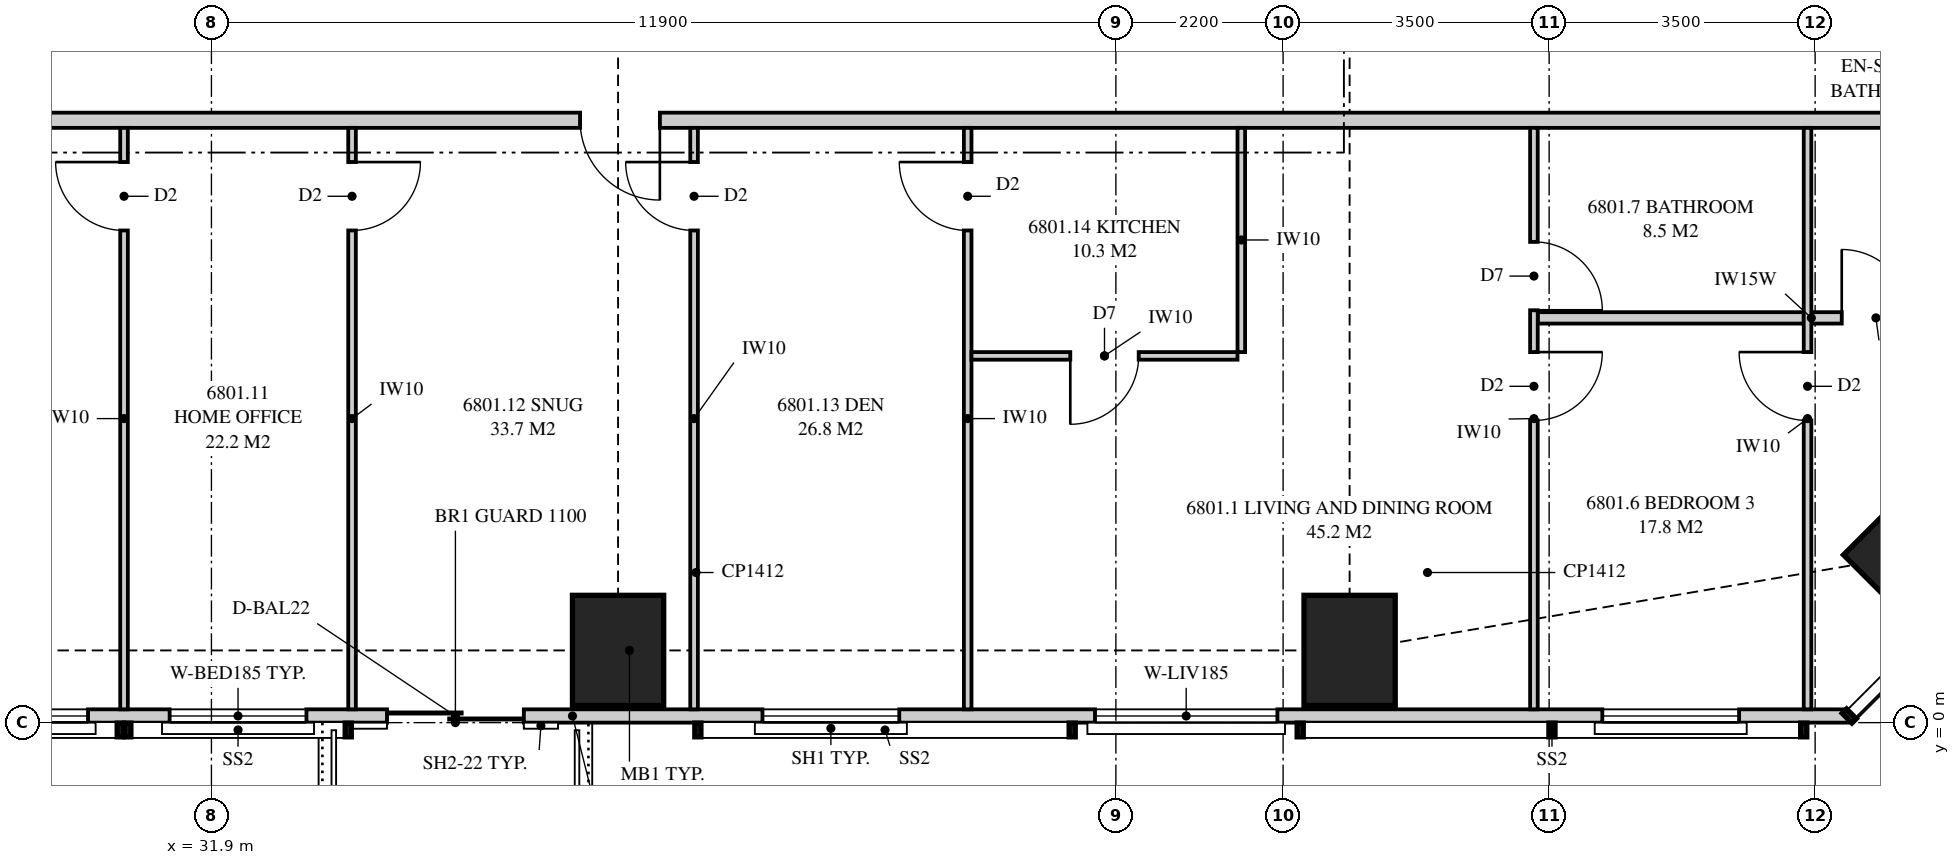
"""IFC4 building model, lengths in metres.
Left out: names, types, materials, properties, quantities, classifications, styles, units other than length and angle.
Written with IfcOpenShell. Run it as: python <this file> out.ifc"""

import sys

from ifc_helpers import new_model, si_unit, direction, frame, frame_2d, origin, origin_2d, place, context, subcontext, project, spatial, polyline, rectangle, outline, extrude, element, fill, save


model = new_model("IFC4")
c1 = context("Model", 3, precision=1e-05, world=origin(), true_north=direction((0.0, 1.0)))
c2 = subcontext(c1, "Body", "Model", "MODEL_VIEW")
j1 = project(units=[si_unit("LENGTHUNIT", "METRE"), si_unit("PLANEANGLEUNIT", "RADIAN")], contexts=[c1])
p1 = place(None, origin())
s1 = spatial("IfcSite", under=j1, at=p1, CompositionType="ELEMENT")
p2 = place(p1, origin())
s2 = spatial("IfcBuilding", under=s1, at=p2, CompositionType="ELEMENT")
p3 = place(p2, frame((0.0, 0.0, 249.45)))
s3 = spatial("IfcBuildingStorey", under=s2, at=p3, CompositionType="ELEMENT", Elevation=249.45)
for number, where, z_axis, x_axis in (
    (1, (37.25, 0.95, 0.0), (0.0, 0.0, 1.0), (0.0, 1.0, 0.0)),
    (2, (46.875, 0.95, 0.0), (0.0, 0.0, 1.0), (0.0, 1.0, 0.0)),
):
    element("IfcColumn", number, at=place(p3, frame(where, z_axis=z_axis, x_axis=x_axis)), inside=s3, PredefinedType="COLUMN", context=c2, shape_type="SweptSolid", body=[
        extrude(rectangle(XDim=1.45, YDim=1.2, at=origin_2d()), origin(), (0.0, 0.0, 1.0), 3.5),
    ])
p4 = place(p3, frame((54.293, 2.207, 0.0), z_axis=(0.0, 0.0, 1.0), x_axis=(0.707106781187, 0.707106781187, 0.0)))
e3 = element("IfcColumn", 3, at=p4, inside=s3, PredefinedType="COLUMN", context=c2, shape_type="SweptSolid", body=[
    extrude(rectangle(XDim=1.3, YDim=1.3, at=origin_2d()), origin(), (0.0, 0.0, 1.0), 3.5),
])
p5 = place(p3, frame((19.851, 0.087, 0.0), z_axis=(0.0, 0.0, 1.0), x_axis=(1.0, 0.0, 0.0)))
e4 = element("IfcWall", 4, at=p5, inside=s3, PredefinedType="SOLIDWALL", context=c2, shape_type="SweptSolid", body=[
    extrude(outline(polyline([(0.0, 0.0), (33.597, 0.0), (33.597, 3.26), (27.239, 3.26), (27.239, 2.3), (27.155, 2.3), (27.155, 3.26), (27.024, 3.26), (27.024, 2.3), (7.774, 2.3), (7.774, 3.26), (7.642, 3.26), (7.642, 2.3), (7.559, 2.3), (7.559, 3.26), (0.0, 3.26), (0.0, 0.0)])), frame((0.0, 0.087, 0.0), z_axis=(0.0, -1.0, 0.0), x_axis=(1.0, 0.0, 0.0)), (0.0, 0.0, 1.0), 0.175),
])
p6 = place(p5, frame((2.649, 0.0, 0.4)))
e5 = element("IfcOpeningElement", 5, at=p6, cuts=e4, PredefinedType="OPENING", context=c2, shape_type="SweptSolid", body=[
    extrude(rectangle(XDim=1.8, YDim=1.85, at=frame_2d((0.9, 0.925))), frame((0.0, 0.097, 0.0), z_axis=(0.0, -1.0, 0.0), x_axis=(1.0, 0.0, 0.0)), (0.0, 0.0, 1.0), 0.195),
])
p7 = place(p5, frame((8.625, 0.0, 0.4)))
e6 = element("IfcOpeningElement", 6, at=p7, cuts=e4, PredefinedType="OPENING", context=c2, shape_type="SweptSolid", body=[
    extrude(rectangle(XDim=1.8, YDim=1.85, at=frame_2d((0.9, 0.925))), frame((0.0, 0.097, 0.0), z_axis=(0.0, -1.0, 0.0), x_axis=(1.0, 0.0, 0.0)), (0.0, 0.0, 1.0), 0.195),
])
p8 = place(p5, frame((11.499, 0.0, 0.4)))
e7 = element("IfcOpeningElement", 7, at=p8, cuts=e4, PredefinedType="OPENING", context=c2, shape_type="SweptSolid", body=[
    extrude(rectangle(XDim=1.8, YDim=1.85, at=frame_2d((0.9, 0.925))), frame((0.0, 0.097, 0.0), z_axis=(0.0, -1.0, 0.0), x_axis=(1.0, 0.0, 0.0)), (0.0, 0.0, 1.0), 0.195),
])
p9 = place(p5, frame((14.359, 0.0, 0.0)))
e8 = element("IfcOpeningElement", 8, at=p9, cuts=e4, PredefinedType="OPENING", context=c2, shape_type="SweptSolid", body=[
    extrude(rectangle(XDim=1.8, YDim=2.25, at=frame_2d((0.9, 1.125))), frame((0.0, 0.097, 0.0), z_axis=(0.0, -1.0, 0.0), x_axis=(1.0, 0.0, 0.0)), (0.0, 0.0, 1.0), 0.195),
])
p10 = place(p5, frame((19.299, 0.0, 0.4)))
e9 = element("IfcOpeningElement", 9, at=p10, cuts=e4, PredefinedType="OPENING", context=c2, shape_type="SweptSolid", body=[
    extrude(rectangle(XDim=1.8, YDim=1.85, at=frame_2d((0.9, 0.925))), frame((0.0, 0.097, 0.0), z_axis=(0.0, -1.0, 0.0), x_axis=(1.0, 0.0, 0.0)), (0.0, 0.0, 1.0), 0.195),
])
p11 = place(p5, frame((23.674, 0.0, 0.4)))
e10 = element("IfcOpeningElement", 10, at=p11, cuts=e4, PredefinedType="OPENING", context=c2, shape_type="SweptSolid", body=[
    extrude(rectangle(XDim=2.4, YDim=1.85, at=frame_2d((1.2, 0.925))), frame((0.0, 0.097, 0.0), z_axis=(0.0, -1.0, 0.0), x_axis=(1.0, 0.0, 0.0)), (0.0, 0.0, 1.0), 0.195),
])
p12 = place(p5, frame((30.349, 0.0, 0.4)))
e11 = element("IfcOpeningElement", 11, at=p12, cuts=e4, PredefinedType="OPENING", context=c2, shape_type="SweptSolid", body=[
    extrude(rectangle(XDim=1.8, YDim=1.85, at=frame_2d((0.9, 0.925))), frame((0.0, 0.097, 0.0), z_axis=(0.0, -1.0, 0.0), x_axis=(1.0, 0.0, 0.0)), (0.0, 0.0, 1.0), 0.195),
])
p13 = place(p3, frame((18.0, 7.925, 0.0), z_axis=(0.0, 0.0, 1.0), x_axis=(1.0, 0.0, 0.0)))
e12 = element("IfcWall", 12, at=p13, inside=s3, PredefinedType="PARTITIONING", context=c2, shape_type="SweptSolid", body=[
    extrude(outline(polyline([(0.0, 0.0), (38.325, 0.0), (38.325, 3.26), (37.875, 3.26), (37.875, 2.3), (36.043, 2.3), (36.043, 3.26), (30.185, 3.26), (30.185, 2.66), (27.565, 2.66), (27.565, 3.26), (20.56, 3.26), (20.56, 2.66), (17.94, 2.66), (17.94, 3.26), (10.935, 3.26), (10.935, 2.66), (8.315, 2.66), (8.315, 3.26), (1.839, 3.26), (1.839, 2.3), (0.0, 2.3), (0.0, 3.26), (0.0, 0.0)])), frame((0.0, 0.1, 0.0), z_axis=(0.0, -1.0, 0.0), x_axis=(1.0, 0.0, 0.0)), (0.0, 0.0, 1.0), 0.2),
])
p14 = place(p13, frame((18.75, 0.0, 0.0)))
e13 = element("IfcOpeningElement", 13, at=p14, cuts=e12, PredefinedType="OPENING", context=c2, shape_type="SweptSolid", body=[
    extrude(rectangle(XDim=1.05, YDim=2.2, at=frame_2d((0.525, 1.1))), frame((0.0, 0.11, 0.0), z_axis=(0.0, -1.0, 0.0), x_axis=(1.0, 0.0, 0.0)), (0.0, 0.0, 1.0), 0.22),
])
p15 = place(p3, frame((49.3, 0.175, 0.0), z_axis=(0.0, 0.0, 1.0), x_axis=(0.0, 1.0, 0.0)))
e14 = element("IfcWall", 14, at=p15, inside=s3, PredefinedType="PARTITIONING", context=c2, shape_type="SweptSolid", body=[
    extrude(outline(polyline([(0.0, 0.0), (7.65, 0.0), (7.65, 3.26), (2.058, 3.26), (2.058, 2.3), (0.314, 2.3), (0.314, 3.26), (0.0, 3.26), (0.0, 0.0)])), frame((0.0, 0.05, 0.0), z_axis=(0.0, -1.0, 0.0), x_axis=(1.0, 0.0, 0.0)), (0.0, 0.0, 1.0), 0.1),
])
p16 = place(p15, frame((3.8, 0.0, 0.0)))
e15 = element("IfcOpeningElement", 15, at=p16, cuts=e14, PredefinedType="OPENING", context=c2, shape_type="SweptSolid", body=[
    extrude(rectangle(XDim=0.9, YDim=2.1, at=frame_2d((0.45, 1.05))), frame((0.0, 0.06, 0.0), z_axis=(0.0, -1.0, 0.0), x_axis=(1.0, 0.0, 0.0)), (0.0, 0.0, 1.0), 0.12),
])
p17 = place(p15, frame((5.25, 0.0, 0.0)))
e16 = element("IfcOpeningElement", 16, at=p17, cuts=e14, PredefinedType="OPENING", context=c2, shape_type="SweptSolid", body=[
    extrude(rectangle(XDim=0.9, YDim=2.1, at=frame_2d((0.45, 1.05))), frame((0.0, 0.06, 0.0), z_axis=(0.0, -1.0, 0.0), x_axis=(1.0, 0.0, 0.0)), (0.0, 0.0, 1.0), 0.12),
])
p18 = place(p3, frame((52.9, 0.175, 0.0), z_axis=(0.0, 0.0, 1.0), x_axis=(0.0, 1.0, 0.0)))
e17 = element("IfcWall", 17, at=p18, inside=s3, PredefinedType="PARTITIONING", context=c2, shape_type="SweptSolid", body=[
    extrude(outline(polyline([(0.0, 0.0), (7.65, 0.0), (7.65, 3.26), (2.668, 3.26), (2.668, 2.3), (0.924, 2.3), (0.924, 3.26), (0.0, 3.26), (0.0, 0.0)])), frame((0.0, 0.05, 0.0), z_axis=(0.0, -1.0, 0.0), x_axis=(1.0, 0.0, 0.0)), (0.0, 0.0, 1.0), 0.1),
])
p19 = place(p18, frame((3.8, 0.0, 0.0)))
e18 = element("IfcOpeningElement", 18, at=p19, cuts=e17, PredefinedType="OPENING", context=c2, shape_type="SweptSolid", body=[
    extrude(rectangle(XDim=0.9, YDim=2.1, at=frame_2d((0.45, 1.05))), frame((0.0, 0.06, 0.0), z_axis=(0.0, -1.0, 0.0), x_axis=(1.0, 0.0, 0.0)), (0.0, 0.0, 1.0), 0.12),
])
p20 = place(p3, frame((49.35, 5.325, 0.0), z_axis=(0.0, 0.0, 1.0), x_axis=(1.0, 0.0, 0.0)))
e19 = element("IfcWall", 19, at=p20, inside=s3, PredefinedType="PLUMBINGWALL", context=c2, shape_type="SweptSolid", body=[
    extrude(rectangle(XDim=3.5, YDim=0.15, at=frame_2d((1.75, 0.0))), origin(), (0.0, 0.0, 1.0), 3.26),
])
p21 = place(p3, frame((52.95, 5.325, 0.0), z_axis=(0.0, 0.0, 1.0), x_axis=(1.0, 0.0, 0.0)))
e20 = element("IfcWall", 20, at=p21, inside=s3, PredefinedType="PLUMBINGWALL", context=c2, shape_type="SweptSolid", body=[
    extrude(outline(polyline([(0.0, 0.0), (3.55, 0.0), (3.55, 3.26), (2.597, 3.26), (2.597, 2.3), (0.815, 2.3), (0.815, 3.26), (0.0, 3.26), (0.0, 0.0)])), frame((0.0, 0.075, 0.0), z_axis=(0.0, -1.0, 0.0), x_axis=(1.0, 0.0, 0.0)), (0.0, 0.0, 1.0), 0.15),
])
p22 = place(p21, frame((0.4, 0.0, 0.0)))
e21 = element("IfcOpeningElement", 21, at=p22, cuts=e20, PredefinedType="OPENING", context=c2, shape_type="SweptSolid", body=[
    extrude(rectangle(XDim=0.9, YDim=2.1, at=frame_2d((0.45, 1.05))), frame((0.0, 0.085, 0.0), z_axis=(0.0, -1.0, 0.0), x_axis=(1.0, 0.0, 0.0)), (0.0, 0.0, 1.0), 0.17),
])
p23 = place(p3, frame((30.75, 0.175, 0.0), z_axis=(0.0, 0.0, 1.0), x_axis=(0.0, 1.0, 0.0)))
e22 = element("IfcWall", 22, at=p23, inside=s3, PredefinedType="PARTITIONING", context=c2, shape_type="SweptSolid", body=[
    extrude(outline(polyline([(0.0, 0.0), (7.65, 0.0), (7.65, 3.26), (1.635, 3.26), (1.635, 2.3), (0.0, 2.3), (0.0, 3.26), (0.0, 0.0)])), frame((0.0, 0.05, 0.0), z_axis=(0.0, -1.0, 0.0), x_axis=(1.0, 0.0, 0.0)), (0.0, 0.0, 1.0), 0.1),
])
p24 = place(p23, frame((6.3, 0.0, 0.0)))
e23 = element("IfcOpeningElement", 23, at=p24, cuts=e22, PredefinedType="OPENING", context=c2, shape_type="SweptSolid", body=[
    extrude(rectangle(XDim=0.9, YDim=2.1, at=frame_2d((0.45, 1.05))), frame((0.0, 0.06, 0.0), z_axis=(0.0, -1.0, 0.0), x_axis=(1.0, 0.0, 0.0)), (0.0, 0.0, 1.0), 0.12),
])
p25 = place(p3, frame((33.75, 0.175, 0.0), z_axis=(0.0, 0.0, 1.0), x_axis=(0.0, 1.0, 0.0)))
e24 = element("IfcWall", 24, at=p25, inside=s3, PredefinedType="PARTITIONING", context=c2, shape_type="SweptSolid", body=[
    extrude(outline(polyline([(0.0, 0.0), (7.65, 0.0), (7.65, 3.26), (1.635, 3.26), (1.635, 2.3), (0.0, 2.3), (0.0, 3.26), (0.0, 0.0)])), frame((0.0, 0.05, 0.0), z_axis=(0.0, -1.0, 0.0), x_axis=(1.0, 0.0, 0.0)), (0.0, 0.0, 1.0), 0.1),
])
p26 = place(p25, frame((6.3, 0.0, 0.0)))
e25 = element("IfcOpeningElement", 25, at=p26, cuts=e24, PredefinedType="OPENING", context=c2, shape_type="SweptSolid", body=[
    extrude(rectangle(XDim=0.9, YDim=2.1, at=frame_2d((0.45, 1.05))), frame((0.0, 0.06, 0.0), z_axis=(0.0, -1.0, 0.0), x_axis=(1.0, 0.0, 0.0)), (0.0, 0.0, 1.0), 0.12),
])
p27 = place(p3, frame((38.25, 0.175, 0.0), z_axis=(0.0, 0.0, 1.0), x_axis=(0.0, 1.0, 0.0)))
e26 = element("IfcWall", 26, at=p27, inside=s3, PredefinedType="PARTITIONING", context=c2, shape_type="SweptSolid", body=[
    extrude(outline(polyline([(0.0, 0.0), (7.65, 0.0), (7.65, 3.26), (7.65, 2.66), (1.635, 2.66), (1.635, 2.3), (0.0, 2.3), (0.0, 3.26), (0.0, 0.0)])), frame((0.0, 0.05, 0.0), z_axis=(0.0, -1.0, 0.0), x_axis=(1.0, 0.0, 0.0)), (0.0, 0.0, 1.0), 0.1),
])
p28 = place(p27, frame((6.3, 0.0, 0.0)))
e27 = element("IfcOpeningElement", 27, at=p28, cuts=e26, PredefinedType="OPENING", context=c2, shape_type="SweptSolid", body=[
    extrude(rectangle(XDim=0.9, YDim=2.1, at=frame_2d((0.45, 1.05))), frame((0.0, 0.06, 0.0), z_axis=(0.0, -1.0, 0.0), x_axis=(1.0, 0.0, 0.0)), (0.0, 0.0, 1.0), 0.12),
])
p29 = place(p3, frame((41.85, 0.175, 0.0), z_axis=(0.0, 0.0, 1.0), x_axis=(0.0, 1.0, 0.0)))
e28 = element("IfcWall", 28, at=p29, inside=s3, PredefinedType="PARTITIONING", context=c2, shape_type="SweptSolid", body=[
    extrude(outline(polyline([(0.0, 0.0), (7.65, 0.0), (7.65, 3.26), (1.635, 3.26), (1.635, 2.3), (0.0, 2.3), (0.0, 3.26), (0.0, 0.0)])), frame((0.0, 0.05, 0.0), z_axis=(0.0, -1.0, 0.0), x_axis=(1.0, 0.0, 0.0)), (0.0, 0.0, 1.0), 0.1),
])
p30 = place(p29, frame((6.3, 0.0, 0.0)))
e29 = element("IfcOpeningElement", 29, at=p30, cuts=e28, PredefinedType="OPENING", context=c2, shape_type="SweptSolid", body=[
    extrude(rectangle(XDim=0.9, YDim=2.1, at=frame_2d((0.45, 1.05))), frame((0.0, 0.06, 0.0), z_axis=(0.0, -1.0, 0.0), x_axis=(1.0, 0.0, 0.0)), (0.0, 0.0, 1.0), 0.12),
])
p31 = place(p3, frame((41.9, 4.825, 0.0), z_axis=(0.0, 0.0, 1.0), x_axis=(1.0, 0.0, 0.0)))
e30 = element("IfcWall", 30, at=p31, inside=s3, PredefinedType="PARTITIONING", context=c2, shape_type="SweptSolid", body=[
    extrude(rectangle(XDim=3.5, YDim=0.1, at=frame_2d((1.75, 0.0))), origin(), (0.0, 0.0, 1.0), 3.26),
])
p32 = place(p31, frame((1.3, 0.0, 0.0)))
e31 = element("IfcOpeningElement", 31, at=p32, cuts=e30, PredefinedType="OPENING", context=c2, shape_type="SweptSolid", body=[
    extrude(rectangle(XDim=0.9, YDim=2.1, at=frame_2d((0.45, 1.05))), frame((0.0, 0.06, 0.0), z_axis=(0.0, -1.0, 0.0), x_axis=(1.0, 0.0, 0.0)), (0.0, 0.0, 1.0), 0.12),
])
p33 = place(p3, frame((45.45, 4.875, 0.0), z_axis=(0.0, 0.0, 1.0), x_axis=(0.0, 1.0, 0.0)))
e32 = element("IfcWall", 32, at=p33, inside=s3, PredefinedType="PARTITIONING", context=c2, shape_type="SweptSolid", body=[
    extrude(rectangle(XDim=2.95, YDim=0.1, at=frame_2d((1.475, 0.0))), origin(), (0.0, 0.0, 1.0), 3.26),
])
p34 = place(p7, origin())
e33 = element("IfcWindow", 33, at=p34, inside=s3, PartitioningType="SINGLE_PANEL", PredefinedType="WINDOW", context=c2, shape_type="SweptSolid", body=[
    extrude(rectangle(XDim=1.8, YDim=1.85, at=frame_2d((0.9, 0.925))), frame((0.0, 0.03, 0.0), z_axis=(0.0, -1.0, 0.0), x_axis=(1.0, 0.0, 0.0)), (0.0, 0.0, 1.0), 0.06),
])
fill(e6, e33)
p35 = place(p8, origin())
e34 = element("IfcWindow", 34, at=p35, inside=s3, PartitioningType="SINGLE_PANEL", PredefinedType="WINDOW", context=c2, shape_type="SweptSolid", body=[
    extrude(rectangle(XDim=1.8, YDim=1.85, at=frame_2d((0.9, 0.925))), frame((0.0, 0.03, 0.0), z_axis=(0.0, -1.0, 0.0), x_axis=(1.0, 0.0, 0.0)), (0.0, 0.0, 1.0), 0.06),
])
fill(e7, e34)
p36 = place(p9, origin())
e35 = element("IfcDoor", 35, at=p36, inside=s3, OperationType="SLIDING_TO_LEFT", PredefinedType="DOOR", context=c2, shape_type="SweptSolid", body=[
    extrude(rectangle(XDim=1.8, YDim=2.25, at=frame_2d((0.9, 1.125))), frame((0.0, 0.025, 0.0), z_axis=(0.0, -1.0, 0.0), x_axis=(1.0, 0.0, 0.0)), (0.0, 0.0, 1.0), 0.05),
])
fill(e8, e35)
p37 = place(p10, origin())
e36 = element("IfcWindow", 36, at=p37, inside=s3, PartitioningType="SINGLE_PANEL", PredefinedType="WINDOW", context=c2, shape_type="SweptSolid", body=[
    extrude(rectangle(XDim=1.8, YDim=1.85, at=frame_2d((0.9, 0.925))), frame((0.0, 0.03, 0.0), z_axis=(0.0, -1.0, 0.0), x_axis=(1.0, 0.0, 0.0)), (0.0, 0.0, 1.0), 0.06),
])
fill(e9, e36)
p38 = place(p11, origin())
e37 = element("IfcWindow", 37, at=p38, inside=s3, PartitioningType="SINGLE_PANEL", PredefinedType="WINDOW", context=c2, shape_type="SweptSolid", body=[
    extrude(rectangle(XDim=2.4, YDim=1.85, at=frame_2d((1.2, 0.925))), frame((0.0, 0.03, 0.0), z_axis=(0.0, -1.0, 0.0), x_axis=(1.0, 0.0, 0.0)), (0.0, 0.0, 1.0), 0.06),
])
fill(e10, e37)
p39 = place(p12, origin())
e38 = element("IfcWindow", 38, at=p39, inside=s3, PartitioningType="SINGLE_PANEL", PredefinedType="WINDOW", context=c2, shape_type="SweptSolid", body=[
    extrude(rectangle(XDim=1.8, YDim=1.85, at=frame_2d((0.9, 0.925))), frame((0.0, 0.03, 0.0), z_axis=(0.0, -1.0, 0.0), x_axis=(1.0, 0.0, 0.0)), (0.0, 0.0, 1.0), 0.06),
])
fill(e11, e38)
p40 = place(p14, frame((1.05, 0.0, 0.0), z_axis=(0.0, 0.0, 1.0), x_axis=(-1.0, 0.0, 0.0)))
e39 = element("IfcDoor", 39, at=p40, inside=s3, OperationType="SINGLE_SWING_LEFT", PredefinedType="DOOR", context=c2, shape_type="SweptSolid", body=[
    extrude(rectangle(XDim=1.05, YDim=2.2, at=frame_2d((0.525, 1.1))), frame((0.0, 0.025, 0.0), z_axis=(0.0, -1.0, 0.0), x_axis=(1.0, 0.0, 0.0)), (0.0, 0.0, 1.0), 0.05),
])
fill(e13, e39)
p41 = place(p16, frame((0.9, 0.0, 0.0), z_axis=(0.0, 0.0, 1.0), x_axis=(-1.0, 0.0, 0.0)))
e40 = element("IfcDoor", 40, at=p41, inside=s3, OperationType="SINGLE_SWING_LEFT", PredefinedType="DOOR", context=c2, shape_type="SweptSolid", body=[
    extrude(rectangle(XDim=0.9, YDim=2.1, at=frame_2d((0.45, 1.05))), frame((0.0, 0.025, 0.0), z_axis=(0.0, -1.0, 0.0), x_axis=(1.0, 0.0, 0.0)), (0.0, 0.0, 1.0), 0.05),
])
fill(e15, e40)
p42 = place(p17, frame((0.9, 0.0, 0.0), z_axis=(0.0, 0.0, 1.0), x_axis=(-1.0, 0.0, 0.0)))
e41 = element("IfcDoor", 41, at=p42, inside=s3, OperationType="SINGLE_SWING_RIGHT", PredefinedType="DOOR", context=c2, shape_type="SweptSolid", body=[
    extrude(rectangle(XDim=0.9, YDim=2.1, at=frame_2d((0.45, 1.05))), frame((0.0, 0.025, 0.0), z_axis=(0.0, -1.0, 0.0), x_axis=(1.0, 0.0, 0.0)), (0.0, 0.0, 1.0), 0.05),
])
fill(e16, e41)
p43 = place(p19, origin())
e42 = element("IfcDoor", 42, at=p43, inside=s3, OperationType="SINGLE_SWING_RIGHT", PredefinedType="DOOR", context=c2, shape_type="SweptSolid", body=[
    extrude(rectangle(XDim=0.9, YDim=2.1, at=frame_2d((0.45, 1.05))), frame((0.0, 0.025, 0.0), z_axis=(0.0, -1.0, 0.0), x_axis=(1.0, 0.0, 0.0)), (0.0, 0.0, 1.0), 0.05),
])
fill(e18, e42)
p44 = place(p22, origin())
e43 = element("IfcDoor", 43, at=p44, inside=s3, OperationType="SINGLE_SWING_LEFT", PredefinedType="DOOR", context=c2, shape_type="SweptSolid", body=[
    extrude(rectangle(XDim=0.9, YDim=2.1, at=frame_2d((0.45, 1.05))), frame((0.0, 0.025, 0.0), z_axis=(0.0, -1.0, 0.0), x_axis=(1.0, 0.0, 0.0)), (0.0, 0.0, 1.0), 0.05),
])
fill(e21, e43)
p45 = place(p24, origin())
e44 = element("IfcDoor", 44, at=p45, inside=s3, OperationType="SINGLE_SWING_RIGHT", PredefinedType="DOOR", context=c2, shape_type="SweptSolid", body=[
    extrude(rectangle(XDim=0.9, YDim=2.1, at=frame_2d((0.45, 1.05))), frame((0.0, 0.025, 0.0), z_axis=(0.0, -1.0, 0.0), x_axis=(1.0, 0.0, 0.0)), (0.0, 0.0, 1.0), 0.05),
])
fill(e23, e44)
p46 = place(p26, frame((0.9, 0.0, 0.0), z_axis=(0.0, 0.0, 1.0), x_axis=(-1.0, 0.0, 0.0)))
e45 = element("IfcDoor", 45, at=p46, inside=s3, OperationType="SINGLE_SWING_LEFT", PredefinedType="DOOR", context=c2, shape_type="SweptSolid", body=[
    extrude(rectangle(XDim=0.9, YDim=2.1, at=frame_2d((0.45, 1.05))), frame((0.0, 0.025, 0.0), z_axis=(0.0, -1.0, 0.0), x_axis=(1.0, 0.0, 0.0)), (0.0, 0.0, 1.0), 0.05),
])
fill(e25, e45)
p47 = place(p28, origin())
e46 = element("IfcDoor", 46, at=p47, inside=s3, OperationType="SINGLE_SWING_RIGHT", PredefinedType="DOOR", context=c2, shape_type="SweptSolid", body=[
    extrude(rectangle(XDim=0.9, YDim=2.1, at=frame_2d((0.45, 1.05))), frame((0.0, 0.025, 0.0), z_axis=(0.0, -1.0, 0.0), x_axis=(1.0, 0.0, 0.0)), (0.0, 0.0, 1.0), 0.05),
])
fill(e27, e46)
p48 = place(p30, origin())
e47 = element("IfcDoor", 47, at=p48, inside=s3, OperationType="SINGLE_SWING_RIGHT", PredefinedType="DOOR", context=c2, shape_type="SweptSolid", body=[
    extrude(rectangle(XDim=0.9, YDim=2.1, at=frame_2d((0.45, 1.05))), frame((0.0, 0.025, 0.0), z_axis=(0.0, -1.0, 0.0), x_axis=(1.0, 0.0, 0.0)), (0.0, 0.0, 1.0), 0.05),
])
fill(e29, e47)
p49 = place(p32, frame((0.9, 0.0, 0.0), z_axis=(0.0, 0.0, 1.0), x_axis=(-1.0, 0.0, 0.0)))
e48 = element("IfcDoor", 48, at=p49, inside=s3, OperationType="SINGLE_SWING_RIGHT", PredefinedType="DOOR", context=c2, shape_type="SweptSolid", body=[
    extrude(rectangle(XDim=0.9, YDim=2.1, at=frame_2d((0.45, 1.05))), frame((0.0, 0.025, 0.0), z_axis=(0.0, -1.0, 0.0), x_axis=(1.0, 0.0, 0.0)), (0.0, 0.0, 1.0), 0.05),
])
fill(e31, e48)
save(model, sys.argv[1])
